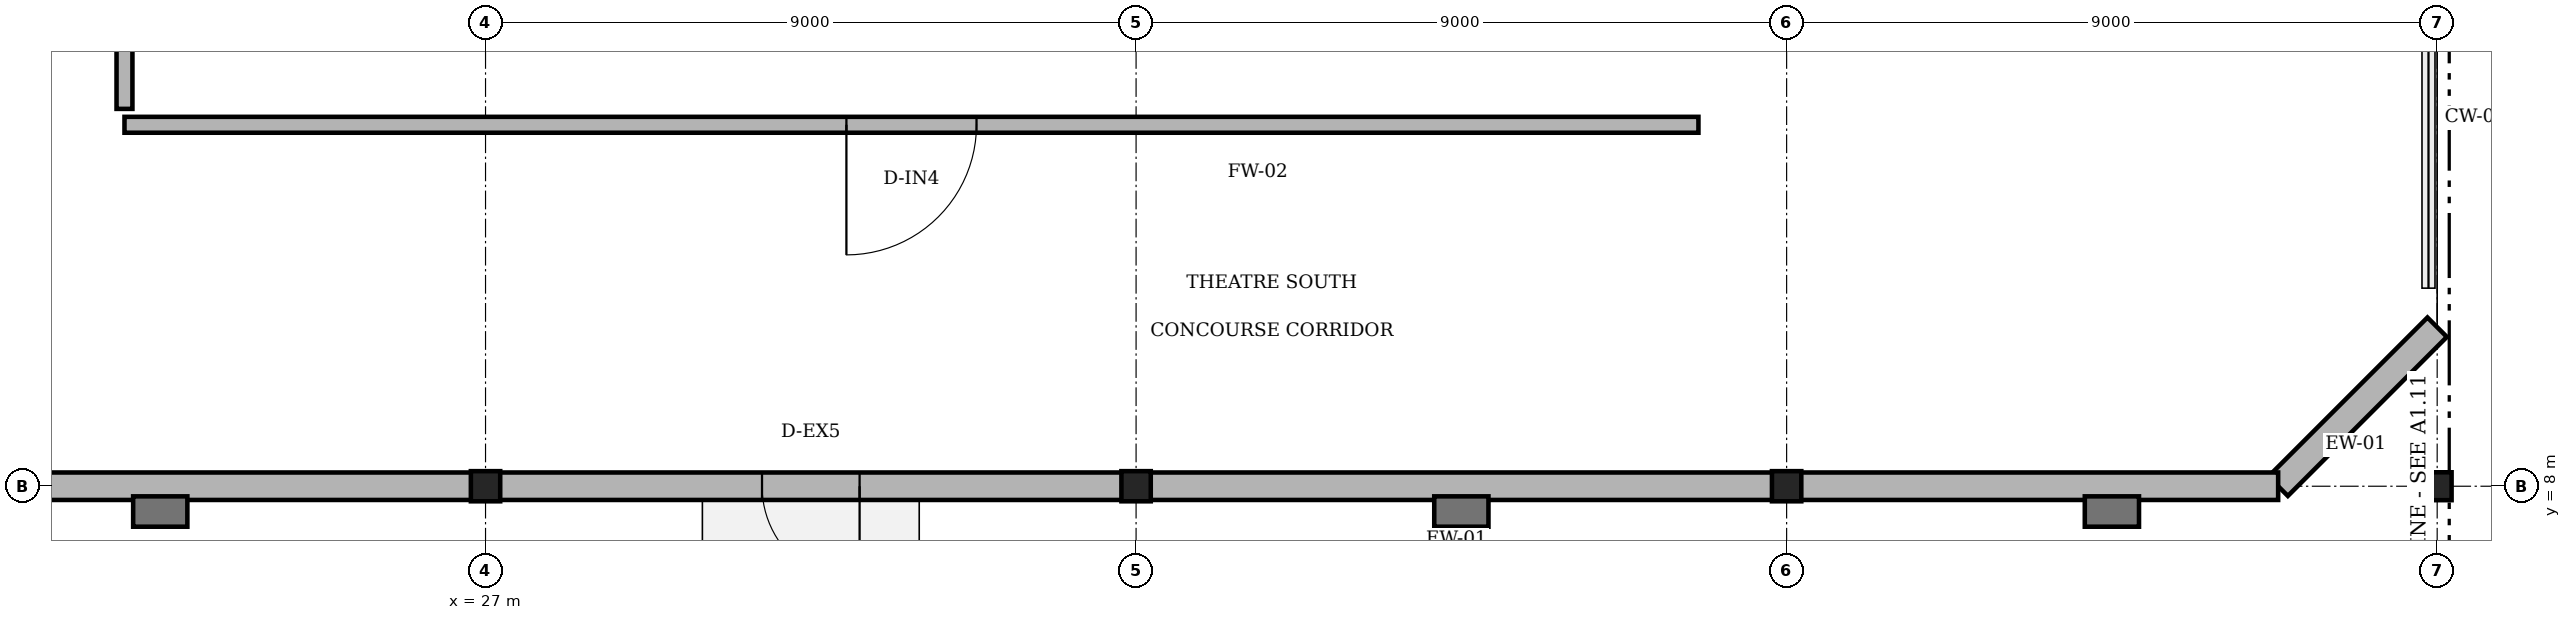
"""IFC4 building model, lengths in metres.
Left out: names, types, materials, properties, quantities, classifications, styles, units other than length and angle.
Written with IfcOpenShell. Run it as: python <this file> out.ifc"""

import sys

from ifc_helpers import new_model, si_unit, direction, frame, frame_2d, origin, origin_2d, place, context, subcontext, project, spatial, rectangle, i_section, extrude, element, fill, save


model = new_model("IFC4")
c1 = context("Model", 3, precision=1e-05, world=origin(), true_north=direction((0.0, 1.0)))
c2 = subcontext(c1, "Body", "Model", "MODEL_VIEW")
j1 = project(units=[si_unit("LENGTHUNIT", "METRE"), si_unit("PLANEANGLEUNIT", "RADIAN")], contexts=[c1])
p1 = place(None, origin())
s1 = spatial("IfcSite", under=j1, at=p1, CompositionType="ELEMENT")
p2 = place(p1, origin())
s2 = spatial("IfcBuilding", under=s1, at=p2, CompositionType="ELEMENT")
p3 = place(p2, origin())
s3 = spatial("IfcBuildingStorey", under=s2, at=p3, CompositionType="ELEMENT", Elevation=0.0)
for number, where, z_axis, x_axis in (
    (1, (27.0, 8.0, 0.0), (0.0, 0.0, 1.0), (1.0, 0.0, 0.0)),
    (2, (36.0, 8.0, 0.0), (0.0, 0.0, 1.0), (1.0, 0.0, 0.0)),
    (3, (45.0, 8.0, 0.0), (0.0, 0.0, 1.0), (1.0, 0.0, 0.0)),
):
    element("IfcColumn", number, at=place(p3, frame(where, z_axis=z_axis, x_axis=x_axis)), inside=s3, PredefinedType="COLUMN", context=c2, shape_type="SweptSolid", body=[
        extrude(i_section(OverallWidth=0.406, OverallDepth=0.417, WebThickness=0.03, FlangeThickness=0.044, FilletRadius=0.015, at=origin_2d()), origin(), (0.0, 0.0, 1.0), 5.4),
    ])
p4 = place(p3, frame((54.0, 8.0, 0.0), z_axis=(0.0, 0.0, 1.0), x_axis=(1.0, 0.0, 0.0)))
e4 = element("IfcColumn", 4, at=p4, inside=s3, PredefinedType="COLUMN", context=c2, shape_type="SweptSolid", body=[
    extrude(i_section(OverallWidth=0.399, OverallDepth=0.386, WebThickness=0.021, FlangeThickness=0.033, FilletRadius=0.015, at=origin_2d()), origin(), (0.0, 0.0, 1.0), 5.4),
])
for number, where, z_axis, x_axis in (
    (5, (22.5, 7.65, 0.0), (0.0, 0.0, 1.0), (1.0, 0.0, 0.0)),
    (6, (40.5, 7.65, 0.0), (0.0, 0.0, 1.0), (1.0, 0.0, 0.0)),
    (7, (49.5, 7.65, 0.0), (0.0, 0.0, 1.0), (1.0, 0.0, 0.0)),
):
    element("IfcColumn", number, at=place(p3, frame(where, z_axis=z_axis, x_axis=x_axis)), inside=s3, PredefinedType="PILASTER", context=c2, shape_type="SweptSolid", body=[
        extrude(rectangle(XDim=0.75, YDim=0.42, at=origin_2d()), origin(), (0.0, 0.0, 1.0), 5.4),
    ])
p5 = place(p3, frame((54.0, 10.2, 0.0), z_axis=(0.0, 0.0, 1.0), x_axis=(-0.707106781187, -0.707106781187, 0.0)))
e8 = element("IfcWall", 8, at=p5, inside=s3, PredefinedType="SOLIDWALL", context=c2, shape_type="SweptSolid", body=[
    extrude(rectangle(XDim=3.111, YDim=0.38, at=frame_2d((1.556, 0.0))), origin(), (0.0, 0.0, 1.0), 4.331),
])
p6 = place(p3, frame((51.8, 8.0, 0.0), z_axis=(0.0, 0.0, 1.0), x_axis=(-1.0, 0.0, 0.0)))
e9 = element("IfcWall", 9, at=p6, inside=s3, PredefinedType="SOLIDWALL", context=c2, shape_type="SweptSolid", body=[
    extrude(rectangle(XDim=40.6, YDim=0.38, at=frame_2d((20.3, 0.0))), origin(), (0.0, 0.0, 1.0), 4.224),
])
p7 = place(p6, frame((19.625, 0.0, 0.0)))
e10 = element("IfcOpeningElement", 10, at=p7, cuts=e9, PredefinedType="OPENING", context=c2, shape_type="SweptSolid", body=[
    extrude(rectangle(XDim=1.35, YDim=2.2, at=frame_2d((0.675, 1.1))), frame((0.0, 0.2, 0.0), z_axis=(0.0, -1.0, 0.0), x_axis=(1.0, 0.0, 0.0)), (0.0, 0.0, 1.0), 0.4),
])
p8 = place(p3, frame((43.78, 13.0, 0.0), z_axis=(0.0, 0.0, 1.0), x_axis=(-1.0, 0.0, 0.0)))
e11 = element("IfcWall", 11, at=p8, inside=s3, PredefinedType="SOLIDWALL", context=c2, shape_type="SweptSolid", body=[
    extrude(rectangle(XDim=21.775, YDim=0.22, at=frame_2d((10.888, 0.0))), origin(), (0.0, 0.0, 1.0), 3.15),
])
p9 = place(p8, frame((9.988, 0.0, 0.0)))
e12 = element("IfcOpeningElement", 12, at=p9, cuts=e11, PredefinedType="OPENING", context=c2, shape_type="SweptSolid", body=[
    extrude(rectangle(XDim=1.8, YDim=2.3, at=frame_2d((0.9, 1.15))), frame((0.0, 0.12, 0.0), z_axis=(0.0, -1.0, 0.0), x_axis=(1.0, 0.0, 0.0)), (0.0, 0.0, 1.0), 0.24),
])
p10 = place(p3, frame((22.005, 13.22, 0.0), z_axis=(0.0, 0.0, 1.0), x_axis=(0.0, 1.0, 0.0)))
e13 = element("IfcWall", 13, at=p10, inside=s3, PredefinedType="SOLIDWALL", context=c2, shape_type="SweptSolid", body=[
    extrude(rectangle(XDim=21.78, YDim=0.22, at=frame_2d((10.89, 0.0))), origin(), (0.0, 0.0, 1.0), 3.15),
])
p11 = place(p7, origin())
e14 = element("IfcDoor", 14, at=p11, inside=s3, OperationType="SINGLE_SWING_LEFT", PredefinedType="DOOR", context=c2, shape_type="SweptSolid", body=[
    extrude(rectangle(XDim=1.35, YDim=2.2, at=frame_2d((0.675, 1.1))), frame((0.0, 0.025, 0.0), z_axis=(0.0, -1.0, 0.0), x_axis=(1.0, 0.0, 0.0)), (0.0, 0.0, 1.0), 0.05),
])
fill(e10, e14)
p12 = place(p9, origin())
e15 = element("IfcDoor", 15, at=p12, inside=s3, OperationType="SINGLE_SWING_RIGHT", PredefinedType="DOOR", context=c2, shape_type="SweptSolid", body=[
    extrude(rectangle(XDim=1.8, YDim=2.3, at=frame_2d((0.9, 1.15))), frame((0.0, 0.025, 0.0), z_axis=(0.0, -1.0, 0.0), x_axis=(1.0, 0.0, 0.0)), (0.0, 0.0, 1.0), 0.05),
])
fill(e12, e15)
save(model, sys.argv[1])
